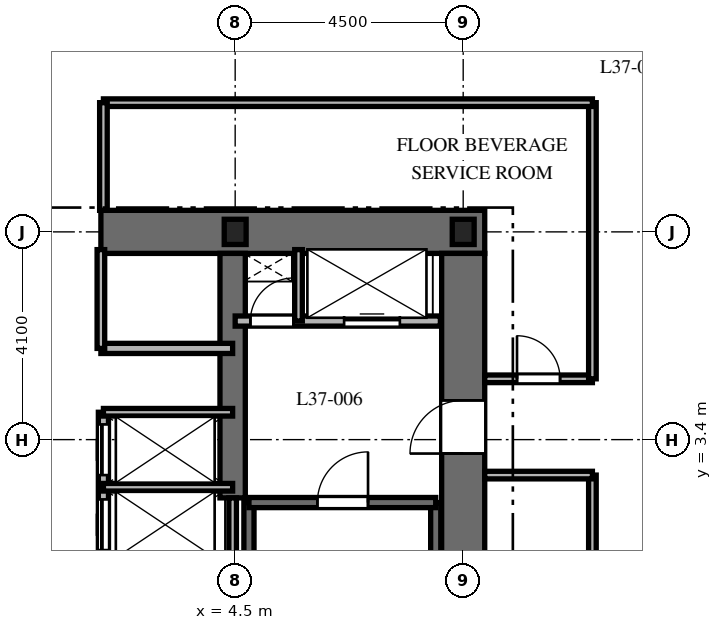
"""IFC4 building model, lengths in metres.
Left out: names, types, materials, properties, quantities, classifications, styles, units other than length and angle.
Written with IfcOpenShell. Run it as: python <this file> out.ifc"""

import sys

from ifc_helpers import new_model, si_unit, direction, frame, frame_2d, origin, origin_2d, place, context, subcontext, project, spatial, rectangle, i_section, extrude, element, fill, save


model = new_model("IFC4")
c1 = context("Model", 3, precision=1e-05, world=origin(), true_north=direction((0.0, 1.0)))
c2 = subcontext(c1, "Body", "Model", "MODEL_VIEW")
j1 = project(units=[si_unit("LENGTHUNIT", "METRE"), si_unit("PLANEANGLEUNIT", "RADIAN")], contexts=[c1])
p1 = place(None, origin())
s1 = spatial("IfcSite", under=j1, at=p1, CompositionType="ELEMENT")
p2 = place(p1, origin())
s2 = spatial("IfcBuilding", under=s1, at=p2, CompositionType="ELEMENT")
p3 = place(p2, frame((0.0, 0.0, 151.7)))
s3 = spatial("IfcBuildingStorey", under=s2, at=p3, CompositionType="ELEMENT", Elevation=151.7)
p4 = place(p3, frame((1.85, 7.5, 0.0), z_axis=(0.0, 0.0, 1.0), x_axis=(1.0, 0.0, 0.0)))
e1 = element("IfcWall", 1, at=p4, inside=s3, PredefinedType="SHEAR", context=c2, shape_type="SweptSolid", body=[
    extrude(rectangle(XDim=7.575, YDim=0.85, at=frame_2d((3.788, 0.0))), origin(), (0.0, 0.0, 1.0), 3.7),
])
p5 = place(p3, frame((9.0, -7.075, 0.0), z_axis=(0.0, 0.0, 1.0), x_axis=(0.0, 1.0, 0.0)))
e2 = element("IfcWall", 2, at=p5, inside=s3, PredefinedType="SHEAR", context=c2, shape_type="SweptSolid", body=[
    extrude(rectangle(XDim=14.15, YDim=0.85, at=frame_2d((7.075, 0.0))), origin(), (0.0, 0.0, 1.0), 3.7),
])
p6 = place(p5, frame((10.2, 0.0, 0.0)))
e3 = element("IfcOpeningElement", 3, at=p6, cuts=e2, PredefinedType="OPENING", context=c2, shape_type="SweptSolid", body=[
    extrude(rectangle(XDim=1.05, YDim=2.15, at=frame_2d((0.525, 1.075))), frame((0.0, 0.435, 0.0), z_axis=(0.0, -1.0, 0.0), x_axis=(1.0, 0.0, 0.0)), (0.0, 0.0, 1.0), 0.87),
])
p7 = place(p3, frame((4.45, 2.25, 0.0), z_axis=(0.0, 0.0, 1.0), x_axis=(0.0, 1.0, 0.0)))
e4 = element("IfcWall", 4, at=p7, inside=s3, PredefinedType="SHEAR", context=c2, shape_type="SweptSolid", body=[
    extrude(rectangle(XDim=4.825, YDim=0.5, at=frame_2d((2.413, 0.0))), origin(), (0.0, 0.0, 1.0), 3.7),
])
for number, where, z_axis, x_axis in (
    (5, (4.772, -6.985, 0.0), (0.0, 0.0, 1.0), (0.0, 1.0, 0.0)),
    (6, (8.458, -6.985, 0.0), (0.0, 0.0, 1.0), (0.0, 1.0, 0.0)),
):
    element("IfcWall", number, at=place(p3, frame(where, z_axis=z_axis, x_axis=x_axis)), inside=s3, PredefinedType="SHEAR", context=c2, shape_type="SweptSolid", body=[
        extrude(rectangle(XDim=9.143, YDim=0.2, at=frame_2d((4.572, 0.0))), origin(), (0.0, 0.0, 1.0), 3.7),
    ])
p8 = place(p3, frame((4.772, 2.158, 0.0), z_axis=(0.0, 0.0, 1.0), x_axis=(1.0, 0.0, 0.0)))
e7 = element("IfcWall", 7, at=p8, inside=s3, PredefinedType="SHEAR", context=c2, shape_type="SweptSolid", body=[
    extrude(rectangle(XDim=3.686, YDim=0.2, at=frame_2d((1.843, 0.0))), origin(), (0.0, 0.0, 1.0), 3.7),
])
p9 = place(p8, frame((1.35, 0.0, 0.0)))
e8 = element("IfcOpeningElement", 8, at=p9, cuts=e7, PredefinedType="OPENING", context=c2, shape_type="SweptSolid", body=[
    extrude(rectangle(XDim=1.0, YDim=2.15, at=frame_2d((0.5, 1.075))), frame((0.0, 0.11, 0.0), z_axis=(0.0, -1.0, 0.0), x_axis=(1.0, 0.0, 0.0)), (0.0, 0.0, 1.0), 0.22),
])
for number, where, z_axis, x_axis in (
    (9, (9.0, 7.5, 0.0), (0.0, 0.0, 1.0), (1.0, 0.0, 0.0)),
    (10, (4.5, 7.5, 0.0), (0.0, 0.0, 1.0), (1.0, 0.0, 0.0)),
):
    element("IfcColumn", number, at=place(p3, frame(where, z_axis=z_axis, x_axis=x_axis)), inside=s3, PredefinedType="COLUMN", context=c2, shape_type="SweptSolid", body=[
        extrude(i_section(OverallWidth=0.432, OverallDepth=0.498, WebThickness=0.056, FlangeThickness=0.089, at=origin_2d()), origin(), (0.0, 0.0, 1.0), 3.7),
    ])
p10 = place(p3, frame((4.5, 5.74, 0.0), z_axis=(0.0, 0.0, 1.0), x_axis=(1.0, 0.0, 0.0)))
e11 = element("IfcWall", 11, at=p10, inside=s3, PredefinedType="PARTITIONING", context=c2, shape_type="SweptSolid", body=[
    extrude(rectangle(XDim=4.05, YDim=0.2, at=frame_2d((2.025, 0.0))), origin(), (0.0, 0.0, 1.0), 3.4),
])
p11 = place(p10, frame((0.3, 0.0, 0.0)))
e12 = element("IfcOpeningElement", 12, at=p11, cuts=e11, PredefinedType="OPENING", context=c2, shape_type="SweptSolid", body=[
    extrude(rectangle(XDim=0.85, YDim=2.03, at=frame_2d((0.425, 1.015))), frame((0.0, 0.11, 0.0), z_axis=(0.0, -1.0, 0.0), x_axis=(1.0, 0.0, 0.0)), (0.0, 0.0, 1.0), 0.22),
])
p12 = place(p10, frame((2.15, 0.0, 0.0)))
e13 = element("IfcOpeningElement", 13, at=p12, cuts=e11, PredefinedType="OPENING", context=c2, shape_type="SweptSolid", body=[
    extrude(rectangle(XDim=1.1, YDim=2.2, at=frame_2d((0.55, 1.1))), frame((0.0, 0.11, 0.0), z_axis=(0.0, -1.0, 0.0), x_axis=(1.0, 0.0, 0.0)), (0.0, 0.0, 1.0), 0.22),
])
p13 = place(p3, frame((5.75, 5.74, 0.0), z_axis=(0.0, 0.0, 1.0), x_axis=(0.0, 1.0, 0.0)))
e14 = element("IfcWall", 14, at=p13, inside=s3, PredefinedType="PARTITIONING", context=c2, shape_type="SweptSolid", body=[
    extrude(rectangle(XDim=1.41, YDim=0.15, at=frame_2d((0.705, 0.0))), origin(), (0.0, 0.0, 1.0), 3.4),
])
p14 = place(p3, frame((1.85, 5.2, 0.0), z_axis=(0.0, 0.0, 1.0), x_axis=(1.0, 0.0, 0.0)))
e15 = element("IfcWall", 15, at=p14, inside=s3, PredefinedType="PARTITIONING", context=c2, shape_type="SweptSolid", body=[
    extrude(rectangle(XDim=2.6, YDim=0.2, at=frame_2d((1.3, 0.0))), origin(), (0.0, 0.0, 1.0), 3.4),
])
p15 = place(p3, frame((1.85, 5.2, 0.0), z_axis=(0.0, 0.0, 1.0), x_axis=(0.0, 1.0, 0.0)))
e16 = element("IfcWall", 16, at=p15, inside=s3, PredefinedType="PARTITIONING", context=c2, shape_type="SweptSolid", body=[
    extrude(rectangle(XDim=1.95, YDim=0.15, at=frame_2d((0.975, 0.0))), origin(), (0.0, 0.0, 1.0), 3.4),
])
p16 = place(p3, frame((4.45, -1.972, 0.0), z_axis=(0.0, 0.0, 1.0), x_axis=(0.0, 1.0, 0.0)))
e17 = element("IfcWall", 17, at=p16, inside=s3, PredefinedType="PARTITIONING", context=c2, shape_type="SweptSolid", body=[
    extrude(rectangle(XDim=4.222, YDim=0.15, at=frame_2d((2.111, 0.0))), origin(), (0.0, 0.0, 1.0), 3.4),
])
p17 = place(p3, frame((1.9, -0.5, 0.0), z_axis=(0.0, 0.0, 1.0), x_axis=(0.0, 1.0, 0.0)))
e18 = element("IfcWall", 18, at=p17, inside=s3, PredefinedType="PARTITIONING", context=c2, shape_type="SweptSolid", body=[
    extrude(rectangle(XDim=4.44, YDim=0.2, at=frame_2d((2.22, 0.0))), origin(), (0.0, 0.0, 1.0), 3.4),
])
p18 = place(p17, frame((0.24, 0.0, 0.0)))
e19 = element("IfcOpeningElement", 19, at=p18, cuts=e18, PredefinedType="OPENING", context=c2, shape_type="SweptSolid", body=[
    extrude(rectangle(XDim=1.0, YDim=2.2, at=frame_2d((0.5, 1.1))), frame((0.0, 0.11, 0.0), z_axis=(0.0, -1.0, 0.0), x_axis=(1.0, 0.0, 0.0)), (0.0, 0.0, 1.0), 0.22),
])
p19 = place(p17, frame((1.72, 0.0, 0.0)))
e20 = element("IfcOpeningElement", 20, at=p19, cuts=e18, PredefinedType="OPENING", context=c2, shape_type="SweptSolid", body=[
    extrude(rectangle(XDim=1.0, YDim=2.2, at=frame_2d((0.5, 1.1))), frame((0.0, 0.11, 0.0), z_axis=(0.0, -1.0, 0.0), x_axis=(1.0, 0.0, 0.0)), (0.0, 0.0, 1.0), 0.22),
])
p20 = place(p17, frame((3.2, 0.0, 0.0)))
e21 = element("IfcOpeningElement", 21, at=p20, cuts=e18, PredefinedType="OPENING", context=c2, shape_type="SweptSolid", body=[
    extrude(rectangle(XDim=1.0, YDim=2.2, at=frame_2d((0.5, 1.1))), frame((0.0, 0.11, 0.0), z_axis=(0.0, -1.0, 0.0), x_axis=(1.0, 0.0, 0.0)), (0.0, 0.0, 1.0), 0.22),
])
for number, where, z_axis, x_axis in (
    (22, (1.9, 3.94, 0.0), (0.0, 0.0, 1.0), (1.0, 0.0, 0.0)),
    (23, (1.9, 2.46, 0.0), (0.0, 0.0, 1.0), (1.0, 0.0, 0.0)),
):
    element("IfcWall", number, at=place(p3, frame(where, z_axis=z_axis, x_axis=x_axis)), inside=s3, PredefinedType="PARTITIONING", context=c2, shape_type="SweptSolid", body=[
        extrude(rectangle(XDim=2.55, YDim=0.15, at=frame_2d((1.275, 0.0))), origin(), (0.0, 0.0, 1.0), 3.4),
    ])
p21 = place(p3, frame((11.55, -10.05, 0.0), z_axis=(0.0, 0.0, 1.0), x_axis=(0.0, 1.0, 0.0)))
e24 = element("IfcWall", 24, at=p21, inside=s3, PredefinedType="PARTITIONING", context=c2, shape_type="SweptSolid", body=[
    extrude(rectangle(XDim=12.75, YDim=0.15, at=frame_2d((6.375, 0.0))), origin(), (0.0, 0.0, 1.0), 2.84),
])
p22 = place(p21, frame((5.95, 0.0, 0.0)))
e25 = element("IfcOpeningElement", 25, at=p22, cuts=e24, PredefinedType="OPENING", context=c2, shape_type="SweptSolid", body=[
    extrude(rectangle(XDim=0.85, YDim=2.03, at=frame_2d((0.425, 1.015))), frame((0.0, 0.085, 0.0), z_axis=(0.0, -1.0, 0.0), x_axis=(1.0, 0.0, 0.0)), (0.0, 0.0, 1.0), 0.17),
])
p23 = place(p3, frame((11.55, 2.7, 0.0), z_axis=(0.0, 0.0, 1.0), x_axis=(-1.0, 0.0, 0.0)))
e26 = element("IfcWall", 26, at=p23, inside=s3, PredefinedType="PARTITIONING", context=c2, shape_type="SweptSolid", body=[
    extrude(rectangle(XDim=2.125, YDim=0.15, at=frame_2d((1.062, 0.0))), origin(), (0.0, 0.0, 1.0), 3.4),
])
p24 = place(p3, frame((9.425, 4.6, 0.0), z_axis=(0.0, 0.0, 1.0), x_axis=(1.0, 0.0, 0.0)))
e27 = element("IfcWall", 27, at=p24, inside=s3, PredefinedType="PARTITIONING", context=c2, shape_type="SweptSolid", body=[
    extrude(rectangle(XDim=2.125, YDim=0.15, at=frame_2d((1.062, 0.0))), origin(), (0.0, 0.0, 1.0), 3.4),
])
p25 = place(p24, frame((0.637, 0.0, 0.0)))
e28 = element("IfcOpeningElement", 28, at=p25, cuts=e27, PredefinedType="OPENING", context=c2, shape_type="SweptSolid", body=[
    extrude(rectangle(XDim=0.85, YDim=2.03, at=frame_2d((0.425, 1.015))), frame((0.0, 0.085, 0.0), z_axis=(0.0, -1.0, 0.0), x_axis=(1.0, 0.0, 0.0)), (0.0, 0.0, 1.0), 0.17),
])
p26 = place(p3, frame((11.55, 4.6, 0.0), z_axis=(0.0, 0.0, 1.0), x_axis=(0.0, 1.0, 0.0)))
e29 = element("IfcWall", 29, at=p26, inside=s3, PredefinedType="PARTITIONING", context=c2, shape_type="SweptSolid", body=[
    extrude(rectangle(XDim=5.45, YDim=0.15, at=frame_2d((2.725, 0.0))), origin(), (0.0, 0.0, 1.0), 2.84),
])
p27 = place(p3, frame((11.55, 10.05, 0.0), z_axis=(0.0, 0.0, 1.0), x_axis=(-1.0, 0.0, 0.0)))
e30 = element("IfcWall", 30, at=p27, inside=s3, PredefinedType="PARTITIONING", context=c2, shape_type="SweptSolid", body=[
    extrude(rectangle(XDim=9.65, YDim=0.15, at=frame_2d((4.825, 0.0))), origin(), (0.0, 0.0, 1.0), 2.84),
])
p28 = place(p3, frame((1.9, 10.05, 0.0), z_axis=(0.0, 0.0, 1.0), x_axis=(0.0, -1.0, 0.0)))
e31 = element("IfcWall", 31, at=p28, inside=s3, PredefinedType="PARTITIONING", context=c2, shape_type="SweptSolid", body=[
    extrude(rectangle(XDim=2.125, YDim=0.15, at=frame_2d((1.062, 0.0))), origin(), (0.0, 0.0, 1.0), 3.4),
])
p29 = place(p9, origin())
e32 = element("IfcDoor", 32, at=p29, inside=s3, OperationType="SINGLE_SWING_RIGHT", PredefinedType="DOOR", context=c2, shape_type="SweptSolid", body=[
    extrude(rectangle(XDim=1.0, YDim=2.15, at=frame_2d((0.5, 1.075))), frame((0.0, 0.025, 0.0), z_axis=(0.0, -1.0, 0.0), x_axis=(1.0, 0.0, 0.0)), (0.0, 0.0, 1.0), 0.05),
])
fill(e8, e32)
p30 = place(p6, origin())
e33 = element("IfcDoor", 33, at=p30, inside=s3, OperationType="SINGLE_SWING_LEFT", PredefinedType="DOOR", context=c2, shape_type="SweptSolid", body=[
    extrude(rectangle(XDim=1.05, YDim=2.15, at=frame_2d((0.525, 1.075))), frame((0.0, 0.025, 0.0), z_axis=(0.0, -1.0, 0.0), x_axis=(1.0, 0.0, 0.0)), (0.0, 0.0, 1.0), 0.05),
])
fill(e3, e33)
p31 = place(p11, origin())
e34 = element("IfcDoor", 34, at=p31, inside=s3, OperationType="SINGLE_SWING_RIGHT", PredefinedType="DOOR", context=c2, shape_type="SweptSolid", body=[
    extrude(rectangle(XDim=0.85, YDim=2.03, at=frame_2d((0.425, 1.015))), frame((0.0, 0.025, 0.0), z_axis=(0.0, -1.0, 0.0), x_axis=(1.0, 0.0, 0.0)), (0.0, 0.0, 1.0), 0.05),
])
fill(e12, e34)
p32 = place(p12, origin())
e35 = element("IfcDoor", 35, at=p32, inside=s3, OperationType="SLIDING_TO_RIGHT", PredefinedType="DOOR", context=c2, shape_type="SweptSolid", body=[
    extrude(rectangle(XDim=1.1, YDim=2.2, at=frame_2d((0.55, 1.1))), frame((0.0, 0.025, 0.0), z_axis=(0.0, -1.0, 0.0), x_axis=(1.0, 0.0, 0.0)), (0.0, 0.0, 1.0), 0.05),
])
fill(e13, e35)
p33 = place(p19, origin())
e36 = element("IfcDoor", 36, at=p33, inside=s3, OperationType="SLIDING_TO_RIGHT", PredefinedType="DOOR", context=c2, shape_type="SweptSolid", body=[
    extrude(rectangle(XDim=1.0, YDim=2.2, at=frame_2d((0.5, 1.1))), frame((0.0, 0.025, 0.0), z_axis=(0.0, -1.0, 0.0), x_axis=(1.0, 0.0, 0.0)), (0.0, 0.0, 1.0), 0.05),
])
fill(e20, e36)
p34 = place(p20, origin())
e37 = element("IfcDoor", 37, at=p34, inside=s3, OperationType="SLIDING_TO_RIGHT", PredefinedType="DOOR", context=c2, shape_type="SweptSolid", body=[
    extrude(rectangle(XDim=1.0, YDim=2.2, at=frame_2d((0.5, 1.1))), frame((0.0, 0.025, 0.0), z_axis=(0.0, -1.0, 0.0), x_axis=(1.0, 0.0, 0.0)), (0.0, 0.0, 1.0), 0.05),
])
fill(e21, e37)
p35 = place(p25, origin())
e38 = element("IfcDoor", 38, at=p35, inside=s3, OperationType="SINGLE_SWING_LEFT", PredefinedType="DOOR", context=c2, shape_type="SweptSolid", body=[
    extrude(rectangle(XDim=0.85, YDim=2.03, at=frame_2d((0.425, 1.015))), frame((0.0, 0.025, 0.0), z_axis=(0.0, -1.0, 0.0), x_axis=(1.0, 0.0, 0.0)), (0.0, 0.0, 1.0), 0.05),
])
fill(e28, e38)
save(model, sys.argv[1])
